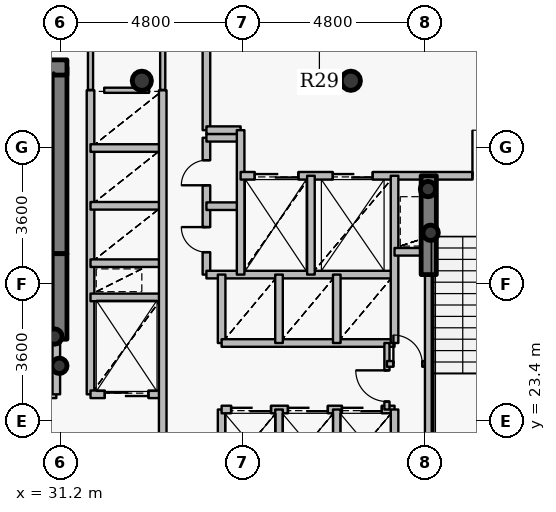
"""IFC4 building model, lengths in metres.
Left out: names, types, materials, properties, quantities, classifications, styles, units other than length and angle.
Written with IfcOpenShell. Run it as: python <this file> out.ifc"""

import sys

from ifc_helpers import new_model, si_unit, direction, frame, frame_2d, origin, origin_2d, place, context, subcontext, project, spatial, rectangle, hollow_circle, extrude, source, transform, mapped, element, fill, save


model = new_model("IFC4")
c1 = context("Model", 3, precision=1e-05, world=origin(), true_north=direction((0.0, 1.0)))
c2 = subcontext(c1, "Body", "Model", "MODEL_VIEW")
j1 = project(units=[si_unit("LENGTHUNIT", "METRE"), si_unit("PLANEANGLEUNIT", "RADIAN")], contexts=[c1])
p1 = place(None, origin())
s1 = spatial("IfcSite", under=j1, at=p1, CompositionType="ELEMENT")
p2 = place(p1, origin())
s2 = spatial("IfcBuilding", under=s1, at=p2, CompositionType="ELEMENT")
p3 = place(p2, frame((0.0, 0.0, 115.95)))
s3 = spatial("IfcBuildingStorey", under=s2, at=p3, CompositionType="ELEMENT", Elevation=115.95)
for number, where, z_axis, x_axis in (
    (1, (38.85, 32.35, 0.0), (0.0, 0.0, 1.0), (1.0, 0.0, 0.0)),
    (2, (33.35, 32.35, 0.0), (0.0, 0.0, 1.0), (1.0, 0.0, 0.0)),
):
    element("IfcColumn", number, at=place(p3, frame(where, z_axis=z_axis, x_axis=x_axis)), inside=s3, PredefinedType="COLUMN", context=c2, shape_type="SweptSolid", body=[
        extrude(hollow_circle(Radius=0.254, WallThickness=0.02, at=origin_2d()), origin(), (0.0, 0.0, 1.0), 3.75),
    ])
p4 = place(p3, frame((31.18, 27.8, 0.0), z_axis=(0.0, 0.0, 1.0), x_axis=(0.0, 1.0, 0.0)))
e3 = element("IfcWall", 3, at=p4, inside=s3, PredefinedType="SHEAR", context=c2, shape_type="SweptSolid", body=[
    extrude(rectangle(XDim=4.9, YDim=0.4, at=frame_2d((2.45, 0.0))), origin(), (0.0, 0.0, 1.0), 3.75),
])
p5 = place(p3, frame((27.28, 32.7, 0.0), z_axis=(0.0, 0.0, 1.0), x_axis=(1.0, 0.0, 0.0)))
e4 = element("IfcWall", 4, at=p5, inside=s3, PredefinedType="SHEAR", context=c2, shape_type="SweptSolid", body=[
    extrude(rectangle(XDim=4.1, YDim=0.4, at=frame_2d((2.05, 0.0))), origin(), (0.0, 0.0, 1.0), 3.75),
])
for number, where, z_axis, x_axis in (
    (5, (31.05, 25.62, 0.0), (0.0, 0.0, 1.0), (1.0, 0.0, 0.0)),
    (6, (31.18, 24.85, 0.0), (0.0, 0.0, 1.0), (1.0, 0.0, 0.0)),
    (7, (40.95, 28.35, 0.0), (0.0, 0.0, 1.0), (1.0, 0.0, 0.0)),
    (8, (40.88, 29.5, 0.0), (0.0, 0.0, 1.0), (1.0, 0.0, 0.0)),
):
    element("IfcColumn", number, at=place(p3, frame(where, z_axis=z_axis, x_axis=x_axis)), inside=s3, PredefinedType="COLUMN", context=c2, shape_type="SweptSolid", body=[
        extrude(hollow_circle(Radius=0.203, WallThickness=0.016, at=origin_2d()), origin(), (0.0, 0.0, 1.0), 3.75),
    ])
p6 = place(p3, frame((31.18, 25.55, 0.0), z_axis=(0.0, 0.0, 1.0), x_axis=(0.0, 1.0, 0.0)))
e9 = element("IfcWall", 9, at=p6, inside=s3, PredefinedType="SHEAR", context=c2, shape_type="SweptSolid", body=[
    extrude(rectangle(XDim=2.25, YDim=0.4, at=frame_2d((1.125, 0.0))), origin(), (0.0, 0.0, 1.0), 3.1),
])
p7 = place(p3, frame((40.9, 27.25, 0.0), z_axis=(0.0, 0.0, 1.0), x_axis=(0.0, 1.0, 0.0)))
e10 = element("IfcWall", 10, at=p7, inside=s3, PredefinedType="SHEAR", context=c2, shape_type="SweptSolid", body=[
    extrude(rectangle(XDim=2.6, YDim=0.4, at=frame_2d((1.3, 0.0))), origin(), (0.0, 0.0, 1.0), 3.1),
])
p8 = place(p3, frame((27.56, 24.1, 0.0), z_axis=(0.0, 0.0, 1.0), x_axis=(1.0, 0.0, 0.0)))
e11 = element("IfcWall", 11, at=p8, inside=s3, PredefinedType="PARTITIONING", context=c2, shape_type="SweptSolid", body=[
    extrude(rectangle(XDim=3.54, YDim=0.2, at=frame_2d((1.77, 0.0))), origin(), (0.0, 0.0, 1.0), 3.5),
])
p9 = place(p8, frame((1.17, 0.0, 0.0)))
e12 = element("IfcOpeningElement", 12, at=p9, cuts=e11, PredefinedType="OPENING", context=c2, shape_type="SweptSolid", body=[
    extrude(rectangle(XDim=1.2, YDim=2.15, at=origin_2d()), frame((0.6, 0.11, 1.075), z_axis=(0.0, -1.0, 0.0), x_axis=(1.0, 0.0, 0.0)), (0.0, 0.0, 1.0), 0.22),
])
p10 = place(p3, frame((31.1, 24.1, 0.0), z_axis=(0.0, 0.0, 1.0), x_axis=(0.0, 1.0, 0.0)))
e13 = element("IfcWall", 13, at=p10, inside=s3, PredefinedType="PARTITIONING", context=c2, shape_type="SweptSolid", body=[
    extrude(rectangle(XDim=1.44, YDim=0.2, at=frame_2d((0.72, 0.0))), origin(), (0.0, 0.0, 1.0), 3.5),
])
p11 = place(p3, frame((32.0, 24.1, 0.0), z_axis=(0.0, 0.0, 1.0), x_axis=(0.0, 1.0, 0.0)))
e14 = element("IfcWall", 14, at=p11, inside=s3, PredefinedType="PARTITIONING", context=c2, shape_type="SweptSolid", body=[
    extrude(rectangle(XDim=8.0, YDim=0.2, at=frame_2d((4.0, 0.0))), origin(), (0.0, 0.0, 1.0), 3.5),
])
p12 = place(p3, frame((32.0, 24.1, 0.0), z_axis=(0.0, 0.0, 1.0), x_axis=(1.0, 0.0, 0.0)))
e15 = element("IfcWall", 15, at=p12, inside=s3, PredefinedType="PARTITIONING", context=c2, shape_type="SweptSolid", body=[
    extrude(rectangle(XDim=1.9, YDim=0.2, at=frame_2d((0.95, 0.0))), origin(), (0.0, 0.0, 1.0), 3.085),
])
p13 = place(p12, frame((0.375, 0.0, 0.0)))
e16 = element("IfcOpeningElement", 16, at=p13, cuts=e15, PredefinedType="OPENING", context=c2, shape_type="SweptSolid", body=[
    extrude(rectangle(XDim=1.15, YDim=2.15, at=origin_2d()), frame((0.575, 0.11, 1.075), z_axis=(0.0, -1.0, 0.0), x_axis=(1.0, 0.0, 0.0)), (0.0, 0.0, 1.0), 0.22),
])
for number, where, z_axis, x_axis in (
    (17, (32.0, 26.65, 0.0), (0.0, 0.0, 1.0), (1.0, 0.0, 0.0)),
    (18, (32.0, 27.55, 0.0), (0.0, 0.0, 1.0), (1.0, 0.0, 0.0)),
    (19, (32.0, 29.06, 0.0), (0.0, 0.0, 1.0), (1.0, 0.0, 0.0)),
    (20, (32.0, 30.58, 0.0), (0.0, 0.0, 1.0), (1.0, 0.0, 0.0)),
):
    element("IfcWall", number, at=place(p3, frame(where, z_axis=z_axis, x_axis=x_axis)), inside=s3, PredefinedType="PARTITIONING", context=c2, shape_type="SweptSolid", body=[
        extrude(rectangle(XDim=1.9, YDim=0.2, at=frame_2d((0.95, 0.0))), origin(), (0.0, 0.0, 1.0), 3.085),
    ])
p14 = place(p3, frame((33.9, 20.6, 0.0), z_axis=(0.0, 0.0, 1.0), x_axis=(0.0, 1.0, 0.0)))
e21 = element("IfcWall", 21, at=p14, inside=s3, PredefinedType="PARTITIONING", context=c2, shape_type="SweptSolid", body=[
    extrude(rectangle(XDim=11.5, YDim=0.2, at=frame_2d((5.75, 0.0))), origin(), (0.0, 0.0, 1.0), 3.085),
])
p15 = place(p3, frame((35.05, 27.25, 0.0), z_axis=(0.0, 0.0, 1.0), x_axis=(0.0, 1.0, 0.0)))
e22 = element("IfcWall", 22, at=p15, inside=s3, PredefinedType="PARTITIONING", context=c2, shape_type="SweptSolid", body=[
    extrude(rectangle(XDim=3.6, YDim=0.2, at=frame_2d((1.8, 0.0))), origin(), (0.0, 0.0, 1.0), 3.5),
])
p16 = place(p15, frame((0.59, 0.0, 0.0)))
e23 = element("IfcOpeningElement", 23, at=p16, cuts=e22, PredefinedType="OPENING", context=c2, shape_type="SweptSolid", body=[
    extrude(rectangle(XDim=0.66, YDim=2.05, at=origin_2d()), frame((0.33, 0.11, 1.025), z_axis=(0.0, -1.0, 0.0), x_axis=(1.0, 0.0, 0.0)), (0.0, 0.0, 1.0), 0.22),
])
p17 = place(p15, frame((2.35, 0.0, 0.0)))
e24 = element("IfcOpeningElement", 24, at=p17, cuts=e22, PredefinedType="OPENING", context=c2, shape_type="SweptSolid", body=[
    extrude(rectangle(XDim=0.66, YDim=2.05, at=origin_2d()), frame((0.33, 0.11, 1.025), z_axis=(0.0, -1.0, 0.0), x_axis=(1.0, 0.0, 0.0)), (0.0, 0.0, 1.0), 0.22),
])
p18 = place(p3, frame((35.05, 27.25, 0.0), z_axis=(0.0, 0.0, 1.0), x_axis=(1.0, 0.0, 0.0)))
e25 = element("IfcWall", 25, at=p18, inside=s3, PredefinedType="PARTITIONING", context=c2, shape_type="SweptSolid", body=[
    extrude(rectangle(XDim=4.95, YDim=0.2, at=frame_2d((2.475, 0.0))), origin(), (0.0, 0.0, 1.0), 3.085),
])
for number, where, z_axis, x_axis in (
    (26, (35.05, 29.05, 0.0), (0.0, 0.0, 1.0), (1.0, 0.0, 0.0)),
    (27, (35.05, 30.85, 0.0), (0.0, 0.0, 1.0), (1.0, 0.0, 0.0)),
):
    element("IfcWall", number, at=place(p3, frame(where, z_axis=z_axis, x_axis=x_axis)), inside=s3, PredefinedType="PARTITIONING", context=c2, shape_type="SweptSolid", body=[
        extrude(rectangle(XDim=0.9, YDim=0.2, at=frame_2d((0.45, 0.0))), origin(), (0.0, 0.0, 1.0), 3.5),
    ])
p19 = place(p3, frame((35.05, 31.05, 0.0), z_axis=(0.0, 0.0, 1.0), x_axis=(0.0, 1.0, 0.0)))
e28 = element("IfcWall", 28, at=p19, inside=s3, PredefinedType="PARTITIONING", context=c2, shape_type="SweptSolid", body=[
    extrude(rectangle(XDim=2.35, YDim=0.2, at=frame_2d((1.175, 0.0))), origin(), (0.0, 0.0, 1.0), 3.085),
])
p20 = place(p3, frame((35.05, 31.05, 0.0), z_axis=(0.0, 0.0, 1.0), x_axis=(1.0, 0.0, 0.0)))
e29 = element("IfcWall", 29, at=p20, inside=s3, PredefinedType="PARTITIONING", context=c2, shape_type="SweptSolid", body=[
    extrude(rectangle(XDim=0.9, YDim=0.2, at=frame_2d((0.45, 0.0))), origin(), (0.0, 0.0, 1.0), 3.5),
])
p21 = place(p3, frame((35.45, 21.9, 0.0), z_axis=(0.0, 0.0, 1.0), x_axis=(0.0, 1.0, 0.0)))
e30 = element("IfcWall", 30, at=p21, inside=s3, PredefinedType="PARTITIONING", context=c2, shape_type="SweptSolid", body=[
    extrude(rectangle(XDim=1.8, YDim=0.2, at=frame_2d((0.9, 0.0))), origin(), (0.0, 0.0, 1.0), 3.5),
])
p22 = place(p3, frame((35.45, 23.7, 0.0), z_axis=(0.0, 0.0, 1.0), x_axis=(1.0, 0.0, 0.0)))
e31 = element("IfcWall", 31, at=p22, inside=s3, PredefinedType="PARTITIONING", context=c2, shape_type="SweptSolid", body=[
    extrude(rectangle(XDim=4.55, YDim=0.2, at=frame_2d((2.275, 0.0))), origin(), (0.0, 0.0, 1.0), 3.085),
])
p23 = place(p22, frame((0.25, 0.0, 0.0)))
e32 = element("IfcOpeningElement", 32, at=p23, cuts=e31, PredefinedType="OPENING", context=c2, shape_type="SweptSolid", body=[
    extrude(rectangle(XDim=1.05, YDim=2.15, at=origin_2d()), frame((0.525, 0.11, 1.075), z_axis=(0.0, -1.0, 0.0), x_axis=(1.0, 0.0, 0.0)), (0.0, 0.0, 1.0), 0.22),
])
p24 = place(p22, frame((1.745, 0.0, 0.0)))
e33 = element("IfcOpeningElement", 33, at=p24, cuts=e31, PredefinedType="OPENING", context=c2, shape_type="SweptSolid", body=[
    extrude(rectangle(XDim=1.05, YDim=2.15, at=origin_2d()), frame((0.525, 0.11, 1.075), z_axis=(0.0, -1.0, 0.0), x_axis=(1.0, 0.0, 0.0)), (0.0, 0.0, 1.0), 0.22),
])
p25 = place(p22, frame((3.165, 0.0, 0.0)))
e34 = element("IfcOpeningElement", 34, at=p25, cuts=e31, PredefinedType="OPENING", context=c2, shape_type="SweptSolid", body=[
    extrude(rectangle(XDim=1.05, YDim=2.15, at=origin_2d()), frame((0.525, 0.11, 1.075), z_axis=(0.0, -1.0, 0.0), x_axis=(1.0, 0.0, 0.0)), (0.0, 0.0, 1.0), 0.22),
])
p26 = place(p3, frame((35.45, 25.45, 0.0), z_axis=(0.0, 0.0, 1.0), x_axis=(0.0, 1.0, 0.0)))
e35 = element("IfcWall", 35, at=p26, inside=s3, PredefinedType="PARTITIONING", context=c2, shape_type="SweptSolid", body=[
    extrude(rectangle(XDim=1.8, YDim=0.2, at=frame_2d((0.9, 0.0))), origin(), (0.0, 0.0, 1.0), 3.5),
])
p27 = place(p3, frame((35.45, 25.45, 0.0), z_axis=(0.0, 0.0, 1.0), x_axis=(1.0, 0.0, 0.0)))
e36 = element("IfcWall", 36, at=p27, inside=s3, PredefinedType="PARTITIONING", context=c2, shape_type="SweptSolid", body=[
    extrude(rectangle(XDim=4.55, YDim=0.2, at=frame_2d((2.275, 0.0))), origin(), (0.0, 0.0, 1.0), 3.085),
])
p28 = place(p3, frame((35.95, 27.25, 0.0), z_axis=(0.0, 0.0, 1.0), x_axis=(0.0, 1.0, 0.0)))
e37 = element("IfcWall", 37, at=p28, inside=s3, PredefinedType="PARTITIONING", context=c2, shape_type="SweptSolid", body=[
    extrude(rectangle(XDim=3.8, YDim=0.2, at=frame_2d((1.9, 0.0))), origin(), (0.0, 0.0, 1.0), 3.5),
])
p29 = place(p3, frame((35.95, 29.85, 0.0), z_axis=(0.0, 0.0, 1.0), x_axis=(1.0, 0.0, 0.0)))
e38 = element("IfcWall", 38, at=p29, inside=s3, PredefinedType="PARTITIONING", context=c2, shape_type="SweptSolid", body=[
    extrude(rectangle(XDim=8.49, YDim=0.2, at=frame_2d((4.245, 0.0))), origin(), (0.0, 0.0, 1.0), 3.085),
])
p30 = place(p29, frame((6.1, 0.0, 0.0)))
e39 = element("IfcOpeningElement", 39, at=p30, cuts=e38, PredefinedType="OPENING", context=c2, shape_type="SweptSolid", body=[
    extrude(rectangle(XDim=1.2, YDim=2.15, at=origin_2d()), frame((0.6, 0.11, 1.075), z_axis=(0.0, -1.0, 0.0), x_axis=(1.0, 0.0, 0.0)), (0.0, 0.0, 1.0), 0.22),
])
p31 = place(p29, frame((0.37, 0.0, 0.0)))
e40 = element("IfcOpeningElement", 40, at=p31, cuts=e38, PredefinedType="OPENING", context=c2, shape_type="SweptSolid", body=[
    extrude(rectangle(XDim=1.15, YDim=2.15, at=origin_2d()), frame((0.575, 0.11, 1.075), z_axis=(0.0, -1.0, 0.0), x_axis=(1.0, 0.0, 0.0)), (0.0, 0.0, 1.0), 0.22),
])
p32 = place(p29, frame((2.425, 0.0, 0.0)))
e41 = element("IfcOpeningElement", 41, at=p32, cuts=e38, PredefinedType="OPENING", context=c2, shape_type="SweptSolid", body=[
    extrude(rectangle(XDim=1.05, YDim=2.15, at=origin_2d()), frame((0.525, 0.11, 1.075), z_axis=(0.0, -1.0, 0.0), x_axis=(1.0, 0.0, 0.0)), (0.0, 0.0, 1.0), 0.22),
])
for number, where, z_axis, x_axis in (
    (42, (36.96, 21.9, 0.0), (0.0, 0.0, 1.0), (0.0, 1.0, 0.0)),
    (43, (36.96, 25.45, 0.0), (0.0, 0.0, 1.0), (0.0, 1.0, 0.0)),
):
    element("IfcWall", number, at=place(p3, frame(where, z_axis=z_axis, x_axis=x_axis)), inside=s3, PredefinedType="PARTITIONING", context=c2, shape_type="SweptSolid", body=[
        extrude(rectangle(XDim=1.8, YDim=0.2, at=frame_2d((0.9, 0.0))), origin(), (0.0, 0.0, 1.0), 3.5),
    ])
p33 = place(p3, frame((37.8, 27.25, 0.0), z_axis=(0.0, 0.0, 1.0), x_axis=(0.0, 1.0, 0.0)))
e44 = element("IfcWall", 44, at=p33, inside=s3, PredefinedType="PARTITIONING", context=c2, shape_type="SweptSolid", body=[
    extrude(rectangle(XDim=2.6, YDim=0.2, at=frame_2d((1.3, 0.0))), origin(), (0.0, 0.0, 1.0), 3.5),
])
for number, where, z_axis, x_axis in (
    (45, (38.48, 21.9, 0.0), (0.0, 0.0, 1.0), (0.0, 1.0, 0.0)),
    (46, (38.48, 25.45, 0.0), (0.0, 0.0, 1.0), (0.0, 1.0, 0.0)),
):
    element("IfcWall", number, at=place(p3, frame(where, z_axis=z_axis, x_axis=x_axis)), inside=s3, PredefinedType="PARTITIONING", context=c2, shape_type="SweptSolid", body=[
        extrude(rectangle(XDim=1.8, YDim=0.2, at=frame_2d((0.9, 0.0))), origin(), (0.0, 0.0, 1.0), 3.5),
    ])
p34 = place(p3, frame((39.8, 23.7, 0.0), z_axis=(0.0, 0.0, 1.0), x_axis=(0.0, 1.0, 0.0)))
e47 = element("IfcWall", 47, at=p34, inside=s3, PredefinedType="PARTITIONING", context=c2, shape_type="SweptSolid", body=[
    extrude(rectangle(XDim=1.75, YDim=0.135, at=frame_2d((0.875, 0.0))), origin(), (0.0, 0.0, 1.0), 3.5),
])
p35 = place(p34, frame((0.21, 0.0, 0.0)))
e48 = element("IfcOpeningElement", 48, at=p35, cuts=e47, PredefinedType="OPENING", context=c2, shape_type="SweptSolid", body=[
    extrude(rectangle(XDim=0.82, YDim=2.1, at=origin_2d()), frame((0.41, 0.078, 1.05), z_axis=(0.0, -1.0, 0.0), x_axis=(1.0, 0.0, 0.0)), (0.0, 0.0, 1.0), 0.155),
])
p36 = place(p3, frame((39.8, 24.9, 0.0), z_axis=(0.0, 0.0, 1.0), x_axis=(1.0, 0.0, 0.0)))
e49 = element("IfcWall", 49, at=p36, inside=s3, PredefinedType="PARTITIONING", context=c2, shape_type="SweptSolid", body=[
    extrude(rectangle(XDim=1.1, YDim=0.15, at=frame_2d((0.55, 0.0))), origin(), (0.0, 0.0, 1.0), 3.5),
])
p37 = place(p36, frame((0.17, 0.0, 0.0)))
e50 = element("IfcOpeningElement", 50, at=p37, cuts=e49, PredefinedType="OPENING", context=c2, shape_type="SweptSolid", body=[
    extrude(rectangle(XDim=0.76, YDim=2.1, at=origin_2d()), frame((0.38, 0.085, 1.05), z_axis=(0.0, -1.0, 0.0), x_axis=(1.0, 0.0, 0.0)), (0.0, 0.0, 1.0), 0.17),
])
p38 = place(p3, frame((40.0, 21.9, 0.0), z_axis=(0.0, 0.0, 1.0), x_axis=(0.0, 1.0, 0.0)))
e51 = element("IfcWall", 51, at=p38, inside=s3, PredefinedType="PARTITIONING", context=c2, shape_type="SweptSolid", body=[
    extrude(rectangle(XDim=1.8, YDim=0.2, at=frame_2d((0.9, 0.0))), origin(), (0.0, 0.0, 1.0), 3.5),
])
p39 = place(p3, frame((40.0, 25.45, 0.0), z_axis=(0.0, 0.0, 1.0), x_axis=(0.0, 1.0, 0.0)))
e52 = element("IfcWall", 52, at=p39, inside=s3, PredefinedType="PARTITIONING", context=c2, shape_type="SweptSolid", body=[
    extrude(rectangle(XDim=4.4, YDim=0.2, at=frame_2d((2.2, 0.0))), origin(), (0.0, 0.0, 1.0), 3.5),
])
p40 = place(p3, frame((40.0, 27.85, 0.0), z_axis=(0.0, 0.0, 1.0), x_axis=(1.0, 0.0, 0.0)))
e53 = element("IfcWall", 53, at=p40, inside=s3, PredefinedType="PARTITIONING", context=c2, shape_type="SweptSolid", body=[
    extrude(rectangle(XDim=0.9, YDim=0.2, at=frame_2d((0.45, 0.0))), origin(), (0.0, 0.0, 1.0), 3.5),
])
p41 = place(p3, frame((40.9, 21.33, 0.0), z_axis=(0.0, 0.0, 1.0), x_axis=(0.0, 1.0, 0.0)))
e54 = element("IfcWall", 54, at=p41, inside=s3, PredefinedType="PARTITIONING", context=c2, shape_type="SweptSolid", body=[
    extrude(rectangle(XDim=5.91, YDim=0.2, at=frame_2d((2.955, 0.0))), origin(), (0.0, 0.0, 1.0), 3.035),
])
p42 = place(p3, frame((32.36, 32.1, 0.0), z_axis=(0.0, 0.0, 1.0), x_axis=(1.0, 0.0, 0.0)))
e55 = element("IfcWall", 55, at=p42, inside=s3, PredefinedType="PARTITIONING", context=c2, shape_type="SweptSolid", body=[
    extrude(rectangle(XDim=1.18, YDim=0.135, at=frame_2d((0.59, 0.0))), origin(), (0.0, 0.0, 1.0), 3.085),
])
p43 = place(p3, frame((32.0, 33.14, 0.0), z_axis=(0.0, 0.0, 1.0), x_axis=(0.0, -1.0, 0.0)))
e56 = element("IfcWall", 56, at=p43, inside=s3, PredefinedType="PARTITIONING", context=c2, shape_type="SweptSolid", body=[
    extrude(rectangle(XDim=1.03, YDim=0.135, at=frame_2d((0.515, 0.0))), origin(), (0.0, 0.0, 1.0), 3.035),
])
p44 = place(p3, frame((33.9, 32.11, 0.0), z_axis=(0.0, 0.0, 1.0), x_axis=(0.0, 1.0, 0.0)))
e57 = element("IfcWall", 57, at=p44, inside=s3, PredefinedType="PARTITIONING", context=c2, shape_type="SweptSolid", body=[
    extrude(rectangle(XDim=1.03, YDim=0.135, at=frame_2d((0.515, 0.0))), origin(), (0.0, 0.0, 1.0), 3.085),
])
m1 = source(origin(), c2, "Body", "SweptSolid", [
    extrude(rectangle(XDim=1.2, YDim=2.15, at=origin_2d()), frame((0.6, 0.025, 1.075), z_axis=(0.0, -1.0, 0.0), x_axis=(1.0, 0.0, 0.0)), (0.0, 0.0, 1.0), 0.05),
])
p45 = place(p30, origin())
e58 = element("IfcDoor", 58, at=p45, inside=s3, OperationType="SINGLE_SWING_LEFT", PredefinedType="DOOR", context=c2, shape_type="MappedRepresentation", body=[
    mapped(m1, transform((0.0, 0.0, 0.0), x_axis=(1.0, 0.0, 0.0), y_axis=(0.0, 1.0, 0.0), z_axis=(0.0, 0.0, 1.0), scale=1.0)),
])
fill(e39, e58)
m2 = source(origin(), c2, "Body", "SweptSolid", [
    extrude(rectangle(XDim=1.15, YDim=2.15, at=origin_2d()), frame((0.575, 0.025, 1.075), z_axis=(0.0, -1.0, 0.0), x_axis=(1.0, 0.0, 0.0)), (0.0, 0.0, 1.0), 0.05),
])
p46 = place(p31, origin())
e59 = element("IfcDoor", 59, at=p46, inside=s3, OperationType="DOUBLE_DOOR_SLIDING", PredefinedType="USERDEFINED", context=c2, shape_type="MappedRepresentation", body=[
    mapped(m2, transform((0.0, 0.0, 0.0), x_axis=(1.0, 0.0, 0.0), y_axis=(0.0, 1.0, 0.0), z_axis=(0.0, 0.0, 1.0), scale=1.0)),
])
fill(e40, e59)
p47 = place(p13, origin())
e60 = element("IfcDoor", 60, at=p47, inside=s3, OperationType="DOUBLE_DOOR_SLIDING", PredefinedType="USERDEFINED", context=c2, shape_type="MappedRepresentation", body=[
    mapped(m2, transform((0.0, 0.0, 0.0), x_axis=(1.0, 0.0, 0.0), y_axis=(0.0, 1.0, 0.0), z_axis=(0.0, 0.0, 1.0), scale=1.0)),
])
fill(e16, e60)
m3 = source(origin(), c2, "Body", "SweptSolid", [
    extrude(rectangle(XDim=1.05, YDim=2.15, at=origin_2d()), frame((0.525, 0.025, 1.075), z_axis=(0.0, -1.0, 0.0), x_axis=(1.0, 0.0, 0.0)), (0.0, 0.0, 1.0), 0.05),
])
p48 = place(p32, origin())
e61 = element("IfcDoor", 61, at=p48, inside=s3, OperationType="DOUBLE_DOOR_SLIDING", PredefinedType="USERDEFINED", context=c2, shape_type="MappedRepresentation", body=[
    mapped(m3, transform((0.0, 0.0, 0.0), x_axis=(1.0, 0.0, 0.0), y_axis=(0.0, 1.0, 0.0), z_axis=(0.0, 0.0, 1.0), scale=1.0)),
])
fill(e41, e61)
p49 = place(p23, origin())
e62 = element("IfcDoor", 62, at=p49, inside=s3, OperationType="DOUBLE_DOOR_SLIDING", PredefinedType="USERDEFINED", context=c2, shape_type="MappedRepresentation", body=[
    mapped(m3, transform((0.0, 0.0, 0.0), x_axis=(1.0, 0.0, 0.0), y_axis=(0.0, 1.0, 0.0), z_axis=(0.0, 0.0, 1.0), scale=1.0)),
])
fill(e32, e62)
p50 = place(p24, origin())
e63 = element("IfcDoor", 63, at=p50, inside=s3, OperationType="DOUBLE_DOOR_SLIDING", PredefinedType="USERDEFINED", context=c2, shape_type="MappedRepresentation", body=[
    mapped(m3, transform((0.0, 0.0, 0.0), x_axis=(1.0, 0.0, 0.0), y_axis=(0.0, 1.0, 0.0), z_axis=(0.0, 0.0, 1.0), scale=1.0)),
])
fill(e33, e63)
p51 = place(p25, origin())
e64 = element("IfcDoor", 64, at=p51, inside=s3, OperationType="DOUBLE_DOOR_SLIDING", PredefinedType="USERDEFINED", context=c2, shape_type="MappedRepresentation", body=[
    mapped(m3, transform((0.0, 0.0, 0.0), x_axis=(1.0, 0.0, 0.0), y_axis=(0.0, 1.0, 0.0), z_axis=(0.0, 0.0, 1.0), scale=1.0)),
])
fill(e34, e64)
m4 = source(origin(), c2, "Body", "SweptSolid", [
    extrude(rectangle(XDim=0.66, YDim=2.05, at=origin_2d()), frame((0.33, 0.025, 1.025), z_axis=(0.0, -1.0, 0.0), x_axis=(1.0, 0.0, 0.0)), (0.0, 0.0, 1.0), 0.05),
])
p52 = place(p16, origin())
e65 = element("IfcDoor", 65, at=p52, inside=s3, OperationType="SINGLE_SWING_RIGHT", PredefinedType="USERDEFINED", context=c2, shape_type="MappedRepresentation", body=[
    mapped(m4, transform((0.0, 0.0, 0.0), x_axis=(1.0, 0.0, 0.0), y_axis=(0.0, 1.0, 0.0), z_axis=(0.0, 0.0, 1.0), scale=1.0)),
])
fill(e23, e65)
p53 = place(p17, origin())
e66 = element("IfcDoor", 66, at=p53, inside=s3, OperationType="SINGLE_SWING_LEFT", PredefinedType="USERDEFINED", context=c2, shape_type="MappedRepresentation", body=[
    mapped(m4, transform((0.0, 0.0, 0.0), x_axis=(1.0, 0.0, 0.0), y_axis=(0.0, 1.0, 0.0), z_axis=(0.0, 0.0, 1.0), scale=1.0)),
])
fill(e24, e66)
m5 = source(origin(), c2, "Body", "SweptSolid", [
    extrude(rectangle(XDim=0.82, YDim=2.1, at=origin_2d()), frame((0.41, 0.025, 1.05), z_axis=(0.0, -1.0, 0.0), x_axis=(1.0, 0.0, 0.0)), (0.0, 0.0, 1.0), 0.05),
])
p54 = place(p35, origin())
e67 = element("IfcDoor", 67, at=p54, inside=s3, OperationType="SINGLE_SWING_RIGHT", PredefinedType="DOOR", context=c2, shape_type="MappedRepresentation", body=[
    mapped(m5, transform((0.0, 0.0, 0.0), x_axis=(1.0, 0.0, 0.0), y_axis=(0.0, 1.0, 0.0), z_axis=(0.0, 0.0, 1.0), scale=1.0)),
])
fill(e48, e67)
m6 = source(origin(), c2, "Body", "SweptSolid", [
    extrude(rectangle(XDim=0.76, YDim=2.1, at=origin_2d()), frame((0.38, 0.025, 1.05), z_axis=(0.0, -1.0, 0.0), x_axis=(1.0, 0.0, 0.0)), (0.0, 0.0, 1.0), 0.05),
])
p55 = place(p37, origin())
e68 = element("IfcDoor", 68, at=p55, inside=s3, OperationType="SINGLE_SWING_LEFT", PredefinedType="DOOR", context=c2, shape_type="MappedRepresentation", body=[
    mapped(m6, transform((0.0, 0.0, 0.0), x_axis=(1.0, 0.0, 0.0), y_axis=(0.0, 1.0, 0.0), z_axis=(0.0, 0.0, 1.0), scale=1.0)),
])
fill(e50, e68)
save(model, sys.argv[1])
